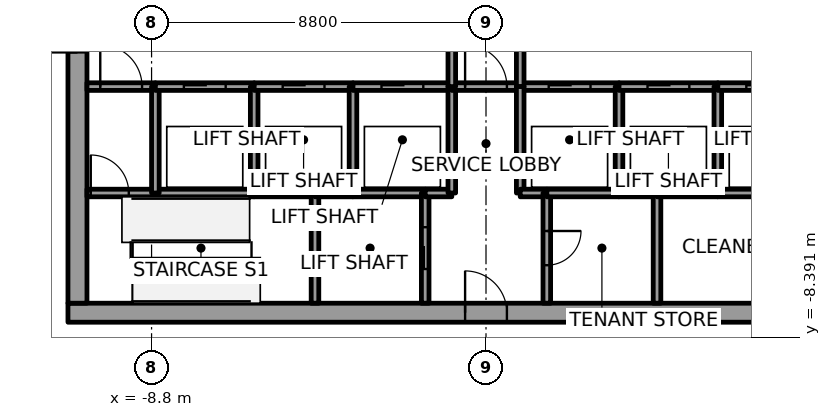
"""IFC4 building model, lengths in metres.
Left out: names, types, materials, properties, quantities, classifications, styles, units other than length and angle.
Written with IfcOpenShell. Run it as: python <this file> out.ifc"""

import sys

from ifc_helpers import new_model, si_unit, direction, frame, frame_2d, origin, place, context, subcontext, project, spatial, rectangle, extrude, element, fill, save


model = new_model("IFC4")
c1 = context("Model", 3, precision=1e-05, world=origin(), true_north=direction((0.0, 1.0)))
c2 = subcontext(c1, "Body", "Model", "MODEL_VIEW")
j1 = project(units=[si_unit("LENGTHUNIT", "METRE"), si_unit("PLANEANGLEUNIT", "RADIAN")], contexts=[c1])
p1 = place(None, origin())
s1 = spatial("IfcSite", under=j1, at=p1, CompositionType="ELEMENT")
p2 = place(p1, origin())
s2 = spatial("IfcBuilding", under=s1, at=p2, CompositionType="ELEMENT")
p3 = place(p2, frame((0.0, 0.0, 193.8)))
s3 = spatial("IfcBuildingStorey", under=s2, at=p3, CompositionType="ELEMENT", Elevation=193.8)
p4 = place(p3, frame((-11.0, -7.75, 0.0), z_axis=(0.0, 0.0, 1.0), x_axis=(1.0, 0.0, 0.0)))
e1 = element("IfcWall", 1, at=p4, inside=s3, PredefinedType="SHEAR", context=c2, shape_type="SweptSolid", body=[
    extrude(rectangle(XDim=22.0, YDim=0.5, at=frame_2d((11.0, 0.0))), origin(), (0.0, 0.0, 1.0), 4.0),
])
p5 = place(p4, frame((10.45, 0.0, 0.0)))
e2 = element("IfcOpeningElement", 2, at=p5, cuts=e1, PredefinedType="OPENING", context=c2, shape_type="SweptSolid", body=[
    extrude(rectangle(XDim=1.1, YDim=2.1, at=frame_2d((0.55, 1.05))), frame((0.0, 0.25, 0.0), z_axis=(0.0, -1.0, 0.0), x_axis=(1.0, 0.0, 0.0)), (0.0, 0.0, 1.0), 0.5),
])
p6 = place(p3, frame((-10.75, -7.5, 0.0), z_axis=(0.0, 0.0, 1.0), x_axis=(0.0, 1.0, 0.0)))
e3 = element("IfcWall", 3, at=p6, inside=s3, PredefinedType="SHEAR", context=c2, shape_type="SweptSolid", body=[
    extrude(rectangle(XDim=15.0, YDim=0.5, at=frame_2d((7.5, 0.0))), origin(), (0.0, 0.0, 1.0), 4.0),
])
p7 = place(p6, frame((6.6, 0.0, 0.0)))
e4 = element("IfcOpeningElement", 4, at=p7, cuts=e3, PredefinedType="OPENING", context=c2, shape_type="SweptSolid", body=[
    extrude(rectangle(XDim=1.8, YDim=2.1, at=frame_2d((0.9, 1.05))), frame((0.0, 0.25, 0.0), z_axis=(0.0, -1.0, 0.0), x_axis=(1.0, 0.0, 0.0)), (0.0, 0.0, 1.0), 0.5),
])
p8 = place(p3, frame((-10.5, -4.6, 0.0), z_axis=(0.0, 0.0, 1.0), x_axis=(1.0, 0.0, 0.0)))
e5 = element("IfcWall", 5, at=p8, inside=s3, PredefinedType="SOLIDWALL", context=c2, shape_type="SweptSolid", body=[
    extrude(rectangle(XDim=1.8, YDim=0.2, at=frame_2d((0.9, 0.0))), origin(), (0.0, 0.0, 1.0), 3.85),
])
p9 = place(p8, frame((0.1, 0.0, 0.0)))
e6 = element("IfcOpeningElement", 6, at=p9, cuts=e5, PredefinedType="OPENING", context=c2, shape_type="SweptSolid", body=[
    extrude(rectangle(XDim=1.0, YDim=2.1, at=frame_2d((0.5, 1.05))), frame((0.0, 0.1, 0.0), z_axis=(0.0, -1.0, 0.0), x_axis=(1.0, 0.0, 0.0)), (0.0, 0.0, 1.0), 0.2),
])
p10 = place(p3, frame((-10.5, -1.8, 0.0), z_axis=(0.0, 0.0, 1.0), x_axis=(1.0, 0.0, 0.0)))
e7 = element("IfcWall", 7, at=p10, inside=s3, PredefinedType="SOLIDWALL", context=c2, shape_type="SweptSolid", body=[
    extrude(rectangle(XDim=1.8, YDim=0.2, at=frame_2d((0.9, 0.0))), origin(), (0.0, 0.0, 1.0), 3.85),
])
p11 = place(p10, frame((0.35, 0.0, 0.0)))
e8 = element("IfcOpeningElement", 8, at=p11, cuts=e7, PredefinedType="OPENING", context=c2, shape_type="SweptSolid", body=[
    extrude(rectangle(XDim=1.1, YDim=2.1, at=frame_2d((0.55, 1.05))), frame((0.0, 0.1, 0.0), z_axis=(0.0, -1.0, 0.0), x_axis=(1.0, 0.0, 0.0)), (0.0, 0.0, 1.0), 0.2),
])
p12 = place(p3, frame((-8.7, -4.6, 0.0), z_axis=(0.0, 0.0, 1.0), x_axis=(1.0, 0.0, 0.0)))
e9 = element("IfcWall", 9, at=p12, inside=s3, PredefinedType="SOLIDWALL", context=c2, shape_type="SweptSolid", body=[
    extrude(rectangle(XDim=2.6, YDim=0.2, at=frame_2d((1.3, 0.0))), origin(), (0.0, 0.0, 1.0), 3.85),
])
p13 = place(p3, frame((-8.7, -4.6, 0.0), z_axis=(0.0, 0.0, 1.0), x_axis=(0.0, 1.0, 0.0)))
e10 = element("IfcWall", 10, at=p13, inside=s3, PredefinedType="SOLIDWALL", context=c2, shape_type="SweptSolid", body=[
    extrude(rectangle(XDim=2.8, YDim=0.2, at=frame_2d((1.4, 0.0))), origin(), (0.0, 0.0, 1.0), 3.85),
])
p14 = place(p3, frame((-8.7, -1.8, 0.0), z_axis=(0.0, 0.0, 1.0), x_axis=(1.0, 0.0, 0.0)))
e11 = element("IfcWall", 11, at=p14, inside=s3, PredefinedType="SOLIDWALL", context=c2, shape_type="SweptSolid", body=[
    extrude(rectangle(XDim=2.6, YDim=0.2, at=frame_2d((1.3, 0.0))), origin(), (0.0, 0.0, 1.0), 3.85),
])
p15 = place(p14, frame((0.75, 0.0, 0.0)))
e12 = element("IfcOpeningElement", 12, at=p15, cuts=e11, PredefinedType="OPENING", context=c2, shape_type="SweptSolid", body=[
    extrude(rectangle(XDim=1.1, YDim=2.1, at=frame_2d((0.55, 1.05))), frame((0.0, 0.1, 0.0), z_axis=(0.0, -1.0, 0.0), x_axis=(1.0, 0.0, 0.0)), (0.0, 0.0, 1.0), 0.2),
])
p16 = place(p3, frame((-6.1, -4.6, 0.0), z_axis=(0.0, 0.0, 1.0), x_axis=(1.0, 0.0, 0.0)))
e13 = element("IfcWall", 13, at=p16, inside=s3, PredefinedType="SOLIDWALL", context=c2, shape_type="SweptSolid", body=[
    extrude(rectangle(XDim=1.6, YDim=0.2, at=frame_2d((0.8, 0.0))), origin(), (0.0, 0.0, 1.0), 3.85),
])
p17 = place(p3, frame((-6.1, -4.6, 0.0), z_axis=(0.0, 0.0, 1.0), x_axis=(0.0, 1.0, 0.0)))
e14 = element("IfcWall", 14, at=p17, inside=s3, PredefinedType="SOLIDWALL", context=c2, shape_type="SweptSolid", body=[
    extrude(rectangle(XDim=2.8, YDim=0.2, at=frame_2d((1.4, 0.0))), origin(), (0.0, 0.0, 1.0), 3.85),
])
p18 = place(p3, frame((-6.1, -1.8, 0.0), z_axis=(0.0, 0.0, 1.0), x_axis=(1.0, 0.0, 0.0)))
e15 = element("IfcWall", 15, at=p18, inside=s3, PredefinedType="SOLIDWALL", context=c2, shape_type="SweptSolid", body=[
    extrude(rectangle(XDim=2.6, YDim=0.2, at=frame_2d((1.3, 0.0))), origin(), (0.0, 0.0, 1.0), 3.85),
])
p19 = place(p18, frame((0.75, 0.0, 0.0)))
e16 = element("IfcOpeningElement", 16, at=p19, cuts=e15, PredefinedType="OPENING", context=c2, shape_type="SweptSolid", body=[
    extrude(rectangle(XDim=1.1, YDim=2.1, at=frame_2d((0.55, 1.05))), frame((0.0, 0.1, 0.0), z_axis=(0.0, -1.0, 0.0), x_axis=(1.0, 0.0, 0.0)), (0.0, 0.0, 1.0), 0.2),
])
p20 = place(p3, frame((-4.5, -4.6, 0.0), z_axis=(0.0, 0.0, 1.0), x_axis=(0.0, -1.0, 0.0)))
e17 = element("IfcWall", 17, at=p20, inside=s3, PredefinedType="SOLIDWALL", context=c2, shape_type="SweptSolid", body=[
    extrude(rectangle(XDim=2.9, YDim=0.2, at=frame_2d((1.45, 0.0))), origin(), (0.0, 0.0, 1.0), 3.85),
])
p21 = place(p3, frame((-4.5, -4.6, 0.0), z_axis=(0.0, 0.0, 1.0), x_axis=(1.0, 0.0, 0.0)))
e18 = element("IfcWall", 18, at=p21, inside=s3, PredefinedType="SOLIDWALL", context=c2, shape_type="SweptSolid", body=[
    extrude(rectangle(XDim=1.0, YDim=0.2, at=frame_2d((0.5, 0.0))), origin(), (0.0, 0.0, 1.0), 3.85),
])
p22 = place(p3, frame((-3.5, -4.6, 0.0), z_axis=(0.0, 0.0, 1.0), x_axis=(1.0, 0.0, 0.0)))
e19 = element("IfcWall", 19, at=p22, inside=s3, PredefinedType="SOLIDWALL", context=c2, shape_type="SweptSolid", body=[
    extrude(rectangle(XDim=1.9, YDim=0.2, at=frame_2d((0.95, 0.0))), origin(), (0.0, 0.0, 1.0), 3.85),
])
p23 = place(p3, frame((-3.5, -4.6, 0.0), z_axis=(0.0, 0.0, 1.0), x_axis=(0.0, 1.0, 0.0)))
e20 = element("IfcWall", 20, at=p23, inside=s3, PredefinedType="SOLIDWALL", context=c2, shape_type="SweptSolid", body=[
    extrude(rectangle(XDim=2.8, YDim=0.2, at=frame_2d((1.4, 0.0))), origin(), (0.0, 0.0, 1.0), 3.85),
])
p24 = place(p3, frame((-3.5, -1.8, 0.0), z_axis=(0.0, 0.0, 1.0), x_axis=(1.0, 0.0, 0.0)))
e21 = element("IfcWall", 21, at=p24, inside=s3, PredefinedType="SOLIDWALL", context=c2, shape_type="SweptSolid", body=[
    extrude(rectangle(XDim=2.6, YDim=0.2, at=frame_2d((1.3, 0.0))), origin(), (0.0, 0.0, 1.0), 3.85),
])
p25 = place(p24, frame((0.75, 0.0, 0.0)))
e22 = element("IfcOpeningElement", 22, at=p25, cuts=e21, PredefinedType="OPENING", context=c2, shape_type="SweptSolid", body=[
    extrude(rectangle(XDim=1.1, YDim=2.1, at=frame_2d((0.55, 1.05))), frame((0.0, 0.1, 0.0), z_axis=(0.0, -1.0, 0.0), x_axis=(1.0, 0.0, 0.0)), (0.0, 0.0, 1.0), 0.2),
])
p26 = place(p3, frame((-1.6, -7.5, 0.0), z_axis=(0.0, 0.0, 1.0), x_axis=(0.0, 1.0, 0.0)))
e23 = element("IfcWall", 23, at=p26, inside=s3, PredefinedType="SOLIDWALL", context=c2, shape_type="SweptSolid", body=[
    extrude(rectangle(XDim=2.9, YDim=0.2, at=frame_2d((1.45, 0.0))), origin(), (0.0, 0.0, 1.0), 3.85),
])
p27 = place(p26, frame((0.9, 0.0, 0.0)))
e24 = element("IfcOpeningElement", 24, at=p27, cuts=e23, PredefinedType="OPENING", context=c2, shape_type="SweptSolid", body=[
    extrude(rectangle(XDim=1.1, YDim=2.1, at=frame_2d((0.55, 1.05))), frame((0.0, 0.1, 0.0), z_axis=(0.0, -1.0, 0.0), x_axis=(1.0, 0.0, 0.0)), (0.0, 0.0, 1.0), 0.2),
])
p28 = place(p3, frame((-1.6, -4.6, 0.0), z_axis=(0.0, 0.0, 1.0), x_axis=(1.0, 0.0, 0.0)))
e25 = element("IfcWall", 25, at=p28, inside=s3, PredefinedType="SOLIDWALL", context=c2, shape_type="SweptSolid", body=[
    extrude(rectangle(XDim=0.7, YDim=0.2, at=frame_2d((0.35, 0.0))), origin(), (0.0, 0.0, 1.0), 3.85),
])
p29 = place(p3, frame((-0.9, -4.6, 0.0), z_axis=(0.0, 0.0, 1.0), x_axis=(0.0, 1.0, 0.0)))
e26 = element("IfcWall", 26, at=p29, inside=s3, PredefinedType="SOLIDWALL", context=c2, shape_type="SweptSolid", body=[
    extrude(rectangle(XDim=2.8, YDim=0.2, at=frame_2d((1.4, 0.0))), origin(), (0.0, 0.0, 1.0), 3.85),
])
p30 = place(p3, frame((-0.9, -1.8, 0.0), z_axis=(0.0, 0.0, 1.0), x_axis=(1.0, 0.0, 0.0)))
e27 = element("IfcWall", 27, at=p30, inside=s3, PredefinedType="SOLIDWALL", context=c2, shape_type="SweptSolid", body=[
    extrude(rectangle(XDim=1.8, YDim=0.2, at=frame_2d((0.9, 0.0))), origin(), (0.0, 0.0, 1.0), 3.85),
])
p31 = place(p30, frame((0.35, 0.0, 0.0)))
e28 = element("IfcOpeningElement", 28, at=p31, cuts=e27, PredefinedType="OPENING", context=c2, shape_type="SweptSolid", body=[
    extrude(rectangle(XDim=1.1, YDim=2.1, at=frame_2d((0.55, 1.05))), frame((0.0, 0.1, 0.0), z_axis=(0.0, -1.0, 0.0), x_axis=(1.0, 0.0, 0.0)), (0.0, 0.0, 1.0), 0.2),
])
p32 = place(p3, frame((-0.9, 1.8, 0.0), z_axis=(0.0, 0.0, 1.0), x_axis=(0.0, -1.0, 0.0)))
e29 = element("IfcWall", 29, at=p32, inside=s3, PredefinedType="SOLIDWALL", context=c2, shape_type="SweptSolid", body=[
    extrude(rectangle(XDim=3.6, YDim=0.2, at=frame_2d((1.8, 0.0))), origin(), (0.0, 0.0, 1.0), 3.85),
])
p33 = place(p32, frame((1.05, 0.0, 0.0)))
e30 = element("IfcOpeningElement", 30, at=p33, cuts=e29, PredefinedType="OPENING", context=c2, shape_type="SweptSolid", body=[
    extrude(rectangle(XDim=1.5, YDim=2.1, at=frame_2d((0.75, 1.05))), frame((0.0, 0.1, 0.0), z_axis=(0.0, -1.0, 0.0), x_axis=(1.0, 0.0, 0.0)), (0.0, 0.0, 1.0), 0.2),
])
p34 = place(p3, frame((0.9, -1.8, 0.0), z_axis=(0.0, 0.0, 1.0), x_axis=(1.0, 0.0, 0.0)))
e31 = element("IfcWall", 31, at=p34, inside=s3, PredefinedType="SOLIDWALL", context=c2, shape_type="SweptSolid", body=[
    extrude(rectangle(XDim=2.6, YDim=0.2, at=frame_2d((1.3, 0.0))), origin(), (0.0, 0.0, 1.0), 3.85),
])
p35 = place(p34, frame((0.75, 0.0, 0.0)))
e32 = element("IfcOpeningElement", 32, at=p35, cuts=e31, PredefinedType="OPENING", context=c2, shape_type="SweptSolid", body=[
    extrude(rectangle(XDim=1.1, YDim=2.1, at=frame_2d((0.55, 1.05))), frame((0.0, 0.1, 0.0), z_axis=(0.0, -1.0, 0.0), x_axis=(1.0, 0.0, 0.0)), (0.0, 0.0, 1.0), 0.2),
])
p36 = place(p3, frame((0.9, -1.8, 0.0), z_axis=(0.0, 0.0, 1.0), x_axis=(0.0, 1.0, 0.0)))
e33 = element("IfcWall", 33, at=p36, inside=s3, PredefinedType="SOLIDWALL", context=c2, shape_type="SweptSolid", body=[
    extrude(rectangle(XDim=3.6, YDim=0.2, at=frame_2d((1.8, 0.0))), origin(), (0.0, 0.0, 1.0), 3.85),
])
p37 = place(p36, frame((1.05, 0.0, 0.0)))
e34 = element("IfcOpeningElement", 34, at=p37, cuts=e33, PredefinedType="OPENING", context=c2, shape_type="SweptSolid", body=[
    extrude(rectangle(XDim=1.5, YDim=2.1, at=frame_2d((0.75, 1.05))), frame((0.0, 0.1, 0.0), z_axis=(0.0, -1.0, 0.0), x_axis=(1.0, 0.0, 0.0)), (0.0, 0.0, 1.0), 0.2),
])
p38 = place(p3, frame((0.9, -1.8, 0.0), z_axis=(0.0, 0.0, 1.0), x_axis=(0.0, -1.0, 0.0)))
e35 = element("IfcWall", 35, at=p38, inside=s3, PredefinedType="SOLIDWALL", context=c2, shape_type="SweptSolid", body=[
    extrude(rectangle(XDim=2.8, YDim=0.2, at=frame_2d((1.4, 0.0))), origin(), (0.0, 0.0, 1.0), 3.85),
])
p39 = place(p3, frame((0.9, -4.6, 0.0), z_axis=(0.0, 0.0, 1.0), x_axis=(1.0, 0.0, 0.0)))
e36 = element("IfcWall", 36, at=p39, inside=s3, PredefinedType="SOLIDWALL", context=c2, shape_type="SweptSolid", body=[
    extrude(rectangle(XDim=0.7, YDim=0.2, at=frame_2d((0.35, 0.0))), origin(), (0.0, 0.0, 1.0), 3.85),
])
p40 = place(p3, frame((1.6, -4.6, 0.0), z_axis=(0.0, 0.0, 1.0), x_axis=(0.0, -1.0, 0.0)))
e37 = element("IfcWall", 37, at=p40, inside=s3, PredefinedType="SOLIDWALL", context=c2, shape_type="SweptSolid", body=[
    extrude(rectangle(XDim=2.9, YDim=0.2, at=frame_2d((1.45, 0.0))), origin(), (0.0, 0.0, 1.0), 3.85),
])
p41 = place(p40, frame((1.0, 0.0, 0.0)))
e38 = element("IfcOpeningElement", 38, at=p41, cuts=e37, PredefinedType="OPENING", context=c2, shape_type="SweptSolid", body=[
    extrude(rectangle(XDim=0.9, YDim=2.1, at=frame_2d((0.45, 1.05))), frame((0.0, 0.1, 0.0), z_axis=(0.0, -1.0, 0.0), x_axis=(1.0, 0.0, 0.0)), (0.0, 0.0, 1.0), 0.2),
])
p42 = place(p3, frame((3.5, -4.6, 0.0), z_axis=(0.0, 0.0, 1.0), x_axis=(-1.0, 0.0, 0.0)))
e39 = element("IfcWall", 39, at=p42, inside=s3, PredefinedType="SOLIDWALL", context=c2, shape_type="SweptSolid", body=[
    extrude(rectangle(XDim=1.9, YDim=0.2, at=frame_2d((0.95, 0.0))), origin(), (0.0, 0.0, 1.0), 3.85),
])
p43 = place(p3, frame((4.5, -4.6, 0.0), z_axis=(0.0, 0.0, 1.0), x_axis=(-1.0, 0.0, 0.0)))
e40 = element("IfcWall", 40, at=p43, inside=s3, PredefinedType="SOLIDWALL", context=c2, shape_type="SweptSolid", body=[
    extrude(rectangle(XDim=1.0, YDim=0.2, at=frame_2d((0.5, 0.0))), origin(), (0.0, 0.0, 1.0), 3.85),
])
p44 = place(p3, frame((3.5, -4.6, 0.0), z_axis=(0.0, 0.0, 1.0), x_axis=(0.0, 1.0, 0.0)))
e41 = element("IfcWall", 41, at=p44, inside=s3, PredefinedType="SOLIDWALL", context=c2, shape_type="SweptSolid", body=[
    extrude(rectangle(XDim=2.8, YDim=0.2, at=frame_2d((1.4, 0.0))), origin(), (0.0, 0.0, 1.0), 3.85),
])
p45 = place(p3, frame((3.5, -1.8, 0.0), z_axis=(0.0, 0.0, 1.0), x_axis=(1.0, 0.0, 0.0)))
e42 = element("IfcWall", 42, at=p45, inside=s3, PredefinedType="SOLIDWALL", context=c2, shape_type="SweptSolid", body=[
    extrude(rectangle(XDim=2.6, YDim=0.2, at=frame_2d((1.3, 0.0))), origin(), (0.0, 0.0, 1.0), 3.85),
])
p46 = place(p45, frame((0.75, 0.0, 0.0)))
e43 = element("IfcOpeningElement", 43, at=p46, cuts=e42, PredefinedType="OPENING", context=c2, shape_type="SweptSolid", body=[
    extrude(rectangle(XDim=1.1, YDim=2.1, at=frame_2d((0.55, 1.05))), frame((0.0, 0.1, 0.0), z_axis=(0.0, -1.0, 0.0), x_axis=(1.0, 0.0, 0.0)), (0.0, 0.0, 1.0), 0.2),
])
p47 = place(p3, frame((4.5, -4.6, 0.0), z_axis=(0.0, 0.0, 1.0), x_axis=(0.0, -1.0, 0.0)))
e44 = element("IfcWall", 44, at=p47, inside=s3, PredefinedType="SOLIDWALL", context=c2, shape_type="SweptSolid", body=[
    extrude(rectangle(XDim=2.9, YDim=0.2, at=frame_2d((1.45, 0.0))), origin(), (0.0, 0.0, 1.0), 3.85),
])
p48 = place(p3, frame((6.1, -4.6, 0.0), z_axis=(0.0, 0.0, 1.0), x_axis=(-1.0, 0.0, 0.0)))
e45 = element("IfcWall", 45, at=p48, inside=s3, PredefinedType="SOLIDWALL", context=c2, shape_type="SweptSolid", body=[
    extrude(rectangle(XDim=1.6, YDim=0.2, at=frame_2d((0.8, 0.0))), origin(), (0.0, 0.0, 1.0), 3.85),
])
p49 = place(p3, frame((8.7, -4.6, 0.0), z_axis=(0.0, 0.0, 1.0), x_axis=(-1.0, 0.0, 0.0)))
e46 = element("IfcWall", 46, at=p49, inside=s3, PredefinedType="SOLIDWALL", context=c2, shape_type="SweptSolid", body=[
    extrude(rectangle(XDim=2.6, YDim=0.2, at=frame_2d((1.3, 0.0))), origin(), (0.0, 0.0, 1.0), 3.85),
])
p50 = place(p3, frame((6.1, -4.6, 0.0), z_axis=(0.0, 0.0, 1.0), x_axis=(0.0, 1.0, 0.0)))
e47 = element("IfcWall", 47, at=p50, inside=s3, PredefinedType="SOLIDWALL", context=c2, shape_type="SweptSolid", body=[
    extrude(rectangle(XDim=2.8, YDim=0.2, at=frame_2d((1.4, 0.0))), origin(), (0.0, 0.0, 1.0), 3.85),
])
p51 = place(p3, frame((6.1, -1.8, 0.0), z_axis=(0.0, 0.0, 1.0), x_axis=(1.0, 0.0, 0.0)))
e48 = element("IfcWall", 48, at=p51, inside=s3, PredefinedType="SOLIDWALL", context=c2, shape_type="SweptSolid", body=[
    extrude(rectangle(XDim=2.6, YDim=0.2, at=frame_2d((1.3, 0.0))), origin(), (0.0, 0.0, 1.0), 3.85),
])
p52 = place(p51, frame((0.75, 0.0, 0.0)))
e49 = element("IfcOpeningElement", 49, at=p52, cuts=e48, PredefinedType="OPENING", context=c2, shape_type="SweptSolid", body=[
    extrude(rectangle(XDim=1.1, YDim=2.1, at=frame_2d((0.55, 1.05))), frame((0.0, 0.1, 0.0), z_axis=(0.0, -1.0, 0.0), x_axis=(1.0, 0.0, 0.0)), (0.0, 0.0, 1.0), 0.2),
])
p53 = place(p15, origin())
e50 = element("IfcDoor", 50, at=p53, inside=s3, OperationType="SLIDING_TO_LEFT", PredefinedType="DOOR", context=c2, shape_type="SweptSolid", body=[
    extrude(rectangle(XDim=1.1, YDim=2.1, at=frame_2d((0.55, 1.05))), frame((0.0, 0.025, 0.0), z_axis=(0.0, -1.0, 0.0), x_axis=(1.0, 0.0, 0.0)), (0.0, 0.0, 1.0), 0.05),
])
fill(e12, e50)
p54 = place(p19, origin())
e51 = element("IfcDoor", 51, at=p54, inside=s3, OperationType="SLIDING_TO_RIGHT", PredefinedType="DOOR", context=c2, shape_type="SweptSolid", body=[
    extrude(rectangle(XDim=1.1, YDim=2.1, at=frame_2d((0.55, 1.05))), frame((0.0, 0.025, 0.0), z_axis=(0.0, -1.0, 0.0), x_axis=(1.0, 0.0, 0.0)), (0.0, 0.0, 1.0), 0.05),
])
fill(e16, e51)
p55 = place(p25, origin())
e52 = element("IfcDoor", 52, at=p55, inside=s3, OperationType="SLIDING_TO_RIGHT", PredefinedType="DOOR", context=c2, shape_type="SweptSolid", body=[
    extrude(rectangle(XDim=1.1, YDim=2.1, at=frame_2d((0.55, 1.05))), frame((0.0, 0.025, 0.0), z_axis=(0.0, -1.0, 0.0), x_axis=(1.0, 0.0, 0.0)), (0.0, 0.0, 1.0), 0.05),
])
fill(e22, e52)
p56 = place(p35, origin())
e53 = element("IfcDoor", 53, at=p56, inside=s3, OperationType="SLIDING_TO_RIGHT", PredefinedType="DOOR", context=c2, shape_type="SweptSolid", body=[
    extrude(rectangle(XDim=1.1, YDim=2.1, at=frame_2d((0.55, 1.05))), frame((0.0, 0.025, 0.0), z_axis=(0.0, -1.0, 0.0), x_axis=(1.0, 0.0, 0.0)), (0.0, 0.0, 1.0), 0.05),
])
fill(e32, e53)
p57 = place(p46, origin())
e54 = element("IfcDoor", 54, at=p57, inside=s3, OperationType="SLIDING_TO_RIGHT", PredefinedType="DOOR", context=c2, shape_type="SweptSolid", body=[
    extrude(rectangle(XDim=1.1, YDim=2.1, at=frame_2d((0.55, 1.05))), frame((0.0, 0.025, 0.0), z_axis=(0.0, -1.0, 0.0), x_axis=(1.0, 0.0, 0.0)), (0.0, 0.0, 1.0), 0.05),
])
fill(e43, e54)
p58 = place(p52, origin())
e55 = element("IfcDoor", 55, at=p58, inside=s3, OperationType="SLIDING_TO_RIGHT", PredefinedType="DOOR", context=c2, shape_type="SweptSolid", body=[
    extrude(rectangle(XDim=1.1, YDim=2.1, at=frame_2d((0.55, 1.05))), frame((0.0, 0.025, 0.0), z_axis=(0.0, -1.0, 0.0), x_axis=(1.0, 0.0, 0.0)), (0.0, 0.0, 1.0), 0.05),
])
fill(e49, e55)
p59 = place(p27, origin())
e56 = element("IfcDoor", 56, at=p59, inside=s3, OperationType="SLIDING_TO_RIGHT", PredefinedType="DOOR", context=c2, shape_type="SweptSolid", body=[
    extrude(rectangle(XDim=1.1, YDim=2.1, at=frame_2d((0.55, 1.05))), frame((0.0, 0.025, 0.0), z_axis=(0.0, -1.0, 0.0), x_axis=(1.0, 0.0, 0.0)), (0.0, 0.0, 1.0), 0.05),
])
fill(e24, e56)
p60 = place(p11, origin())
e57 = element("IfcDoor", 57, at=p60, inside=s3, OperationType="SINGLE_SWING_LEFT", PredefinedType="DOOR", context=c2, shape_type="SweptSolid", body=[
    extrude(rectangle(XDim=1.1, YDim=2.1, at=frame_2d((0.55, 1.05))), frame((0.0, 0.025, 0.0), z_axis=(0.0, -1.0, 0.0), x_axis=(1.0, 0.0, 0.0)), (0.0, 0.0, 1.0), 0.05),
])
fill(e8, e57)
p61 = place(p31, origin())
e58 = element("IfcDoor", 58, at=p61, inside=s3, OperationType="SINGLE_SWING_RIGHT", PredefinedType="DOOR", context=c2, shape_type="SweptSolid", body=[
    extrude(rectangle(XDim=1.1, YDim=2.1, at=frame_2d((0.55, 1.05))), frame((0.0, 0.025, 0.0), z_axis=(0.0, -1.0, 0.0), x_axis=(1.0, 0.0, 0.0)), (0.0, 0.0, 1.0), 0.05),
])
fill(e28, e58)
p62 = place(p9, origin())
e59 = element("IfcDoor", 59, at=p62, inside=s3, OperationType="SINGLE_SWING_LEFT", PredefinedType="DOOR", context=c2, shape_type="SweptSolid", body=[
    extrude(rectangle(XDim=1.0, YDim=2.1, at=frame_2d((0.5, 1.05))), frame((0.0, 0.025, 0.0), z_axis=(0.0, -1.0, 0.0), x_axis=(1.0, 0.0, 0.0)), (0.0, 0.0, 1.0), 0.05),
])
fill(e6, e59)
p63 = place(p41, origin())
e60 = element("IfcDoor", 60, at=p63, inside=s3, OperationType="SINGLE_SWING_LEFT", PredefinedType="DOOR", context=c2, shape_type="SweptSolid", body=[
    extrude(rectangle(XDim=0.9, YDim=2.1, at=frame_2d((0.45, 1.05))), frame((0.0, 0.025, 0.0), z_axis=(0.0, -1.0, 0.0), x_axis=(1.0, 0.0, 0.0)), (0.0, 0.0, 1.0), 0.05),
])
fill(e38, e60)
p64 = place(p7, origin())
e61 = element("IfcDoor", 61, at=p64, inside=s3, OperationType="DOUBLE_DOOR_SINGLE_SWING", PredefinedType="DOOR", context=c2, shape_type="SweptSolid", body=[
    extrude(rectangle(XDim=1.8, YDim=2.1, at=frame_2d((0.9, 1.05))), frame((0.0, 0.025, 0.0), z_axis=(0.0, -1.0, 0.0), x_axis=(1.0, 0.0, 0.0)), (0.0, 0.0, 1.0), 0.05),
])
fill(e4, e61)
p65 = place(p5, origin())
e62 = element("IfcDoor", 62, at=p65, inside=s3, OperationType="SINGLE_SWING_LEFT", PredefinedType="DOOR", context=c2, shape_type="SweptSolid", body=[
    extrude(rectangle(XDim=1.1, YDim=2.1, at=frame_2d((0.55, 1.05))), frame((0.0, 0.025, 0.0), z_axis=(0.0, -1.0, 0.0), x_axis=(1.0, 0.0, 0.0)), (0.0, 0.0, 1.0), 0.05),
])
fill(e2, e62)
save(model, sys.argv[1])
